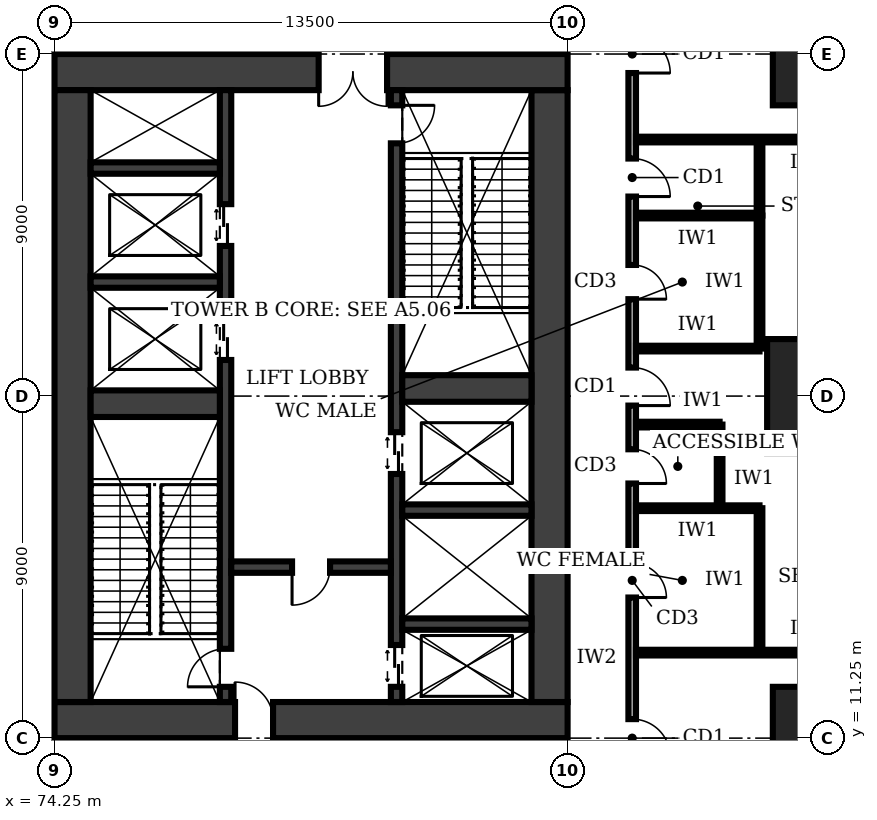
"""IFC4 building model, lengths in metres.
Left out: names, types, materials, properties, quantities, classifications, styles, units other than length and angle.
Written with IfcOpenShell. Run it as: python <this file> out.ifc"""

import sys

from ifc_helpers import new_model, si_unit, direction, frame, frame_2d, origin, origin_2d, place, context, subcontext, project, spatial, rectangle, extrude, element, fill, save


model = new_model("IFC4")
c1 = context("Model", 3, precision=1e-05, world=origin(), true_north=direction((0.0, 1.0)))
c2 = subcontext(c1, "Body", "Model", "MODEL_VIEW")
j1 = project(units=[si_unit("LENGTHUNIT", "METRE"), si_unit("PLANEANGLEUNIT", "RADIAN")], contexts=[c1])
p1 = place(None, origin())
s1 = spatial("IfcSite", under=j1, at=p1, CompositionType="ELEMENT")
p2 = place(p1, origin())
s2 = spatial("IfcBuilding", under=s1, at=p2, CompositionType="ELEMENT")
p3 = place(p2, frame((0.0, 0.0, 11.0)))
s3 = spatial("IfcBuildingStorey", under=s2, at=p3, CompositionType="ELEMENT", Elevation=11.0)
p4 = place(p3, frame((74.25, 11.725, 0.0), z_axis=(0.0, 0.0, 1.0), x_axis=(1.0, 0.0, 0.0)))
e1 = element("IfcWall", 1, at=p4, inside=s3, PredefinedType="SHEAR", context=c2, shape_type="SweptSolid", body=[
    extrude(rectangle(XDim=13.5, YDim=0.95, at=frame_2d((6.75, 0.0))), origin(), (0.0, 0.0, 1.0), 5.0),
])
p5 = place(p4, frame((4.75, 0.0, 0.0)))
e2 = element("IfcOpeningElement", 2, at=p5, cuts=e1, PredefinedType="OPENING", context=c2, shape_type="SweptSolid", body=[
    extrude(rectangle(XDim=1.0, YDim=2.1, at=frame_2d((0.5, 1.05))), frame((0.0, 0.485, 0.0), z_axis=(0.0, -1.0, 0.0), x_axis=(1.0, 0.0, 0.0)), (0.0, 0.0, 1.0), 0.97),
])
p6 = place(p3, frame((87.275, 12.2, 0.0), z_axis=(0.0, 0.0, 1.0), x_axis=(0.0, 1.0, 0.0)))
e3 = element("IfcWall", 3, at=p6, inside=s3, PredefinedType="SHEAR", context=c2, shape_type="SweptSolid", body=[
    extrude(rectangle(XDim=16.1, YDim=0.95, at=frame_2d((8.05, 0.0))), origin(), (0.0, 0.0, 1.0), 5.0),
])
p7 = place(p3, frame((87.75, 28.775, 0.0), z_axis=(0.0, 0.0, 1.0), x_axis=(-1.0, 0.0, 0.0)))
e4 = element("IfcWall", 4, at=p7, inside=s3, PredefinedType="SHEAR", context=c2, shape_type="SweptSolid", body=[
    extrude(rectangle(XDim=13.5, YDim=0.95, at=frame_2d((6.75, 0.0))), origin(), (0.0, 0.0, 1.0), 5.0),
])
p8 = place(p7, frame((4.75, 0.0, 0.0)))
e5 = element("IfcOpeningElement", 5, at=p8, cuts=e4, PredefinedType="OPENING", context=c2, shape_type="SweptSolid", body=[
    extrude(rectangle(XDim=1.8, YDim=2.1, at=frame_2d((0.9, 1.05))), frame((0.0, 0.485, 0.0), z_axis=(0.0, -1.0, 0.0), x_axis=(1.0, 0.0, 0.0)), (0.0, 0.0, 1.0), 0.97),
])
p9 = place(p3, frame((74.725, 28.3, 0.0), z_axis=(0.0, 0.0, 1.0), x_axis=(0.0, -1.0, 0.0)))
e6 = element("IfcWall", 6, at=p9, inside=s3, PredefinedType="SHEAR", context=c2, shape_type="SweptSolid", body=[
    extrude(rectangle(XDim=16.1, YDim=0.95, at=frame_2d((8.05, 0.0))), origin(), (0.0, 0.0, 1.0), 5.0),
])
p10 = place(p3, frame((78.75, 12.2, 0.0), z_axis=(0.0, 0.0, 1.0), x_axis=(0.0, 1.0, 0.0)))
e7 = element("IfcWall", 7, at=p10, inside=s3, PredefinedType="SHEAR", context=c2, shape_type="SweptSolid", body=[
    extrude(rectangle(XDim=16.1, YDim=0.3, at=frame_2d((8.05, 0.0))), origin(), (0.0, 0.0, 1.0), 5.0),
])
p11 = place(p10, frame((0.4, 0.0, 0.0)))
e8 = element("IfcOpeningElement", 8, at=p11, cuts=e7, PredefinedType="OPENING", context=c2, shape_type="SweptSolid", body=[
    extrude(rectangle(XDim=1.0, YDim=2.1, at=frame_2d((0.5, 1.05))), frame((0.0, 0.16, 0.0), z_axis=(0.0, -1.0, 0.0), x_axis=(1.0, 0.0, 0.0)), (0.0, 0.0, 1.0), 0.32),
])
p12 = place(p10, frame((9.0, 0.0, 0.0)))
e9 = element("IfcOpeningElement", 9, at=p12, cuts=e7, PredefinedType="OPENING", context=c2, shape_type="SweptSolid", body=[
    extrude(rectangle(XDim=1.1, YDim=2.1, at=frame_2d((0.55, 1.05))), frame((0.0, 0.16, 0.0), z_axis=(0.0, -1.0, 0.0), x_axis=(1.0, 0.0, 0.0)), (0.0, 0.0, 1.0), 0.32),
])
p13 = place(p10, frame((12.0, 0.0, 0.0)))
e10 = element("IfcOpeningElement", 10, at=p13, cuts=e7, PredefinedType="OPENING", context=c2, shape_type="SweptSolid", body=[
    extrude(rectangle(XDim=1.1, YDim=2.1, at=frame_2d((0.55, 1.05))), frame((0.0, 0.16, 0.0), z_axis=(0.0, -1.0, 0.0), x_axis=(1.0, 0.0, 0.0)), (0.0, 0.0, 1.0), 0.32),
])
p14 = place(p3, frame((83.25, 12.2, 0.0), z_axis=(0.0, 0.0, 1.0), x_axis=(0.0, 1.0, 0.0)))
e11 = element("IfcWall", 11, at=p14, inside=s3, PredefinedType="SHEAR", context=c2, shape_type="SweptSolid", body=[
    extrude(rectangle(XDim=16.1, YDim=0.3, at=frame_2d((8.05, 0.0))), origin(), (0.0, 0.0, 1.0), 5.0),
])
p15 = place(p14, frame((14.7, 0.0, 0.0)))
e12 = element("IfcOpeningElement", 12, at=p15, cuts=e11, PredefinedType="OPENING", context=c2, shape_type="SweptSolid", body=[
    extrude(rectangle(XDim=1.0, YDim=2.1, at=frame_2d((0.5, 1.05))), frame((0.0, 0.16, 0.0), z_axis=(0.0, -1.0, 0.0), x_axis=(1.0, 0.0, 0.0)), (0.0, 0.0, 1.0), 0.32),
])
p16 = place(p14, frame((0.4, 0.0, 0.0)))
e13 = element("IfcOpeningElement", 13, at=p16, cuts=e11, PredefinedType="OPENING", context=c2, shape_type="SweptSolid", body=[
    extrude(rectangle(XDim=1.1, YDim=2.1, at=frame_2d((0.55, 1.05))), frame((0.0, 0.16, 0.0), z_axis=(0.0, -1.0, 0.0), x_axis=(1.0, 0.0, 0.0)), (0.0, 0.0, 1.0), 0.32),
])
p17 = place(p14, frame((6.0, 0.0, 0.0)))
e14 = element("IfcOpeningElement", 14, at=p17, cuts=e11, PredefinedType="OPENING", context=c2, shape_type="SweptSolid", body=[
    extrude(rectangle(XDim=1.1, YDim=2.1, at=frame_2d((0.55, 1.05))), frame((0.0, 0.16, 0.0), z_axis=(0.0, -1.0, 0.0), x_axis=(1.0, 0.0, 0.0)), (0.0, 0.0, 1.0), 0.32),
])
p18 = place(p3, frame((75.2, 20.05, 0.0), z_axis=(0.0, 0.0, 1.0), x_axis=(1.0, 0.0, 0.0)))
e15 = element("IfcWall", 15, at=p18, inside=s3, PredefinedType="SHEAR", context=c2, shape_type="SweptSolid", body=[
    extrude(rectangle(XDim=3.4, YDim=0.7, at=frame_2d((1.7, 0.0))), origin(), (0.0, 0.0, 1.0), 5.0),
])
p19 = place(p3, frame((78.9, 15.75, 0.0), z_axis=(0.0, 0.0, 1.0), x_axis=(1.0, 0.0, 0.0)))
e16 = element("IfcWall", 16, at=p19, inside=s3, PredefinedType="SHEAR", context=c2, shape_type="SweptSolid", body=[
    extrude(rectangle(XDim=4.2, YDim=0.3, at=frame_2d((2.1, 0.0))), origin(), (0.0, 0.0, 1.0), 5.0),
])
p20 = place(p19, frame((1.6, 0.0, 0.0)))
e17 = element("IfcOpeningElement", 17, at=p20, cuts=e16, PredefinedType="OPENING", context=c2, shape_type="SweptSolid", body=[
    extrude(rectangle(XDim=1.0, YDim=2.1, at=frame_2d((0.5, 1.05))), frame((0.0, 0.16, 0.0), z_axis=(0.0, -1.0, 0.0), x_axis=(1.0, 0.0, 0.0)), (0.0, 0.0, 1.0), 0.32),
])
for number, where, z_axis, x_axis in (
    (18, (83.4, 14.25, 0.0), (0.0, 0.0, 1.0), (1.0, 0.0, 0.0)),
    (19, (83.4, 17.25, 0.0), (0.0, 0.0, 1.0), (1.0, 0.0, 0.0)),
):
    element("IfcWall", number, at=place(p3, frame(where, z_axis=z_axis, x_axis=x_axis)), inside=s3, PredefinedType="SHEAR", context=c2, shape_type="SweptSolid", body=[
        extrude(rectangle(XDim=3.4, YDim=0.3, at=frame_2d((1.7, 0.0))), origin(), (0.0, 0.0, 1.0), 5.0),
    ])
p21 = place(p3, frame((83.4, 20.45, 0.0), z_axis=(0.0, 0.0, 1.0), x_axis=(1.0, 0.0, 0.0)))
e20 = element("IfcWall", 20, at=p21, inside=s3, PredefinedType="SHEAR", context=c2, shape_type="SweptSolid", body=[
    extrude(rectangle(XDim=3.4, YDim=0.7, at=frame_2d((1.7, 0.0))), origin(), (0.0, 0.0, 1.0), 5.0),
])
for number, where, z_axis, x_axis in (
    (21, (75.2, 23.25, 0.0), (0.0, 0.0, 1.0), (1.0, 0.0, 0.0)),
    (22, (75.2, 26.25, 0.0), (0.0, 0.0, 1.0), (1.0, 0.0, 0.0)),
):
    element("IfcWall", number, at=place(p3, frame(where, z_axis=z_axis, x_axis=x_axis)), inside=s3, PredefinedType="SHEAR", context=c2, shape_type="SweptSolid", body=[
        extrude(rectangle(XDim=3.4, YDim=0.3, at=frame_2d((1.7, 0.0))), origin(), (0.0, 0.0, 1.0), 5.0),
    ])
p22 = place(p3, frame((94.5, 11.25, 0.0), z_axis=(0.0, 0.0, 1.0), x_axis=(1.0, 0.0, 0.0)))
e23 = element("IfcColumn", 23, at=p22, inside=s3, PredefinedType="COLUMN", context=c2, shape_type="SweptSolid", body=[
    extrude(rectangle(XDim=2.7, YDim=2.7, at=origin_2d()), origin(), (0.0, 0.0, 1.0), 5.0),
])
p23 = place(p3, frame((94.5, 20.25, 0.0), z_axis=(0.0, 0.0, 1.0), x_axis=(1.0, 0.0, 0.0)))
e24 = element("IfcColumn", 24, at=p23, inside=s3, PredefinedType="COLUMN", context=c2, shape_type="SweptSolid", body=[
    extrude(rectangle(XDim=3.0, YDim=3.0, at=origin_2d()), origin(), (0.0, 0.0, 1.0), 5.0),
])
p24 = place(p3, frame((94.5, 29.25, 0.0), z_axis=(0.0, 0.0, 1.0), x_axis=(1.0, 0.0, 0.0)))
e25 = element("IfcColumn", 25, at=p24, inside=s3, PredefinedType="COLUMN", context=c2, shape_type="SweptSolid", body=[
    extrude(rectangle(XDim=2.7, YDim=2.7, at=origin_2d()), origin(), (0.0, 0.0, 1.0), 5.0),
])
p25 = place(p3, frame((89.45, 9.2, 0.0), z_axis=(0.0, 0.0, 1.0), x_axis=(0.0, 1.0, 0.0)))
e26 = element("IfcWall", 26, at=p25, inside=s3, PredefinedType="SOLIDWALL", context=c2, shape_type="SweptSolid", body=[
    extrude(rectangle(XDim=22.3, YDim=0.2, at=frame_2d((11.15, 0.0))), origin(), (0.0, 0.0, 1.0), 4.7),
])
p26 = place(p25, frame((1.55, 0.0, 0.0)))
e27 = element("IfcOpeningElement", 27, at=p26, cuts=e26, PredefinedType="OPENING", context=c2, shape_type="SweptSolid", body=[
    extrude(rectangle(XDim=1.0, YDim=2.1, at=frame_2d((0.5, 1.05))), frame((0.0, 0.11, 0.0), z_axis=(0.0, -1.0, 0.0), x_axis=(1.0, 0.0, 0.0)), (0.0, 0.0, 1.0), 0.22),
])
p27 = place(p25, frame((5.75, 0.0, 0.0)))
e28 = element("IfcOpeningElement", 28, at=p27, cuts=e26, PredefinedType="OPENING", context=c2, shape_type="SweptSolid", body=[
    extrude(rectangle(XDim=0.9, YDim=2.1, at=frame_2d((0.45, 1.05))), frame((0.0, 0.11, 0.0), z_axis=(0.0, -1.0, 0.0), x_axis=(1.0, 0.0, 0.0)), (0.0, 0.0, 1.0), 0.22),
])
p28 = place(p25, frame((8.75, 0.0, 0.0)))
e29 = element("IfcOpeningElement", 29, at=p28, cuts=e26, PredefinedType="OPENING", context=c2, shape_type="SweptSolid", body=[
    extrude(rectangle(XDim=0.9, YDim=2.1, at=frame_2d((0.45, 1.05))), frame((0.0, 0.11, 0.0), z_axis=(0.0, -1.0, 0.0), x_axis=(1.0, 0.0, 0.0)), (0.0, 0.0, 1.0), 0.22),
])
p29 = place(p25, frame((13.6, 0.0, 0.0)))
e30 = element("IfcOpeningElement", 30, at=p29, cuts=e26, PredefinedType="OPENING", context=c2, shape_type="SweptSolid", body=[
    extrude(rectangle(XDim=0.9, YDim=2.1, at=frame_2d((0.45, 1.05))), frame((0.0, 0.11, 0.0), z_axis=(0.0, -1.0, 0.0), x_axis=(1.0, 0.0, 0.0)), (0.0, 0.0, 1.0), 0.22),
])
p30 = place(p25, frame((16.3, 0.0, 0.0)))
e31 = element("IfcOpeningElement", 31, at=p30, cuts=e26, PredefinedType="OPENING", context=c2, shape_type="SweptSolid", body=[
    extrude(rectangle(XDim=1.0, YDim=2.1, at=frame_2d((0.5, 1.05))), frame((0.0, 0.11, 0.0), z_axis=(0.0, -1.0, 0.0), x_axis=(1.0, 0.0, 0.0)), (0.0, 0.0, 1.0), 0.22),
])
p31 = place(p25, frame((10.8, 0.0, 0.0)))
e32 = element("IfcOpeningElement", 32, at=p31, cuts=e26, PredefinedType="OPENING", context=c2, shape_type="SweptSolid", body=[
    extrude(rectangle(XDim=1.0, YDim=2.1, at=frame_2d((0.5, 1.05))), frame((0.0, 0.11, 0.0), z_axis=(0.0, -1.0, 0.0), x_axis=(1.0, 0.0, 0.0)), (0.0, 0.0, 1.0), 0.22),
])
p32 = place(p25, frame((19.55, 0.0, 0.0)))
e33 = element("IfcOpeningElement", 33, at=p32, cuts=e26, PredefinedType="OPENING", context=c2, shape_type="SweptSolid", body=[
    extrude(rectangle(XDim=1.0, YDim=2.1, at=frame_2d((0.5, 1.05))), frame((0.0, 0.11, 0.0), z_axis=(0.0, -1.0, 0.0), x_axis=(1.0, 0.0, 0.0)), (0.0, 0.0, 1.0), 0.22),
])
for number, where, z_axis, x_axis in (
    (34, (89.55, 13.5, 0.0), (0.0, 0.0, 1.0), (1.0, 0.0, 0.0)),
    (35, (89.55, 27.0, 0.0), (0.0, 0.0, 1.0), (1.0, 0.0, 0.0)),
):
    element("IfcWall", number, at=place(p3, frame(where, z_axis=z_axis, x_axis=x_axis)), inside=s3, PredefinedType="PARTITIONING", context=c2, shape_type="SweptSolid", body=[
        extrude(rectangle(XDim=9.15, YDim=0.15, at=frame_2d((4.575, 0.0))), origin(), (0.0, 0.0, 1.0), 4.7),
    ])
p33 = place(p3, frame((89.55, 17.3, 0.0), z_axis=(0.0, 0.0, 1.0), x_axis=(1.0, 0.0, 0.0)))
e36 = element("IfcWall", 36, at=p33, inside=s3, PredefinedType="PARTITIONING", context=c2, shape_type="SweptSolid", body=[
    extrude(rectangle(XDim=3.25, YDim=0.15, at=frame_2d((1.625, 0.0))), origin(), (0.0, 0.0, 1.0), 4.7),
])
p34 = place(p3, frame((89.55, 19.5, 0.0), z_axis=(0.0, 0.0, 1.0), x_axis=(1.0, 0.0, 0.0)))
e37 = element("IfcWall", 37, at=p34, inside=s3, PredefinedType="PARTITIONING", context=c2, shape_type="SweptSolid", body=[
    extrude(rectangle(XDim=2.2, YDim=0.15, at=frame_2d((1.1, 0.0))), origin(), (0.0, 0.0, 1.0), 4.7),
])
for number, where, z_axis, x_axis in (
    (38, (89.55, 21.5, 0.0), (0.0, 0.0, 1.0), (1.0, 0.0, 0.0)),
    (39, (89.55, 25.0, 0.0), (0.0, 0.0, 1.0), (1.0, 0.0, 0.0)),
):
    element("IfcWall", number, at=place(p3, frame(where, z_axis=z_axis, x_axis=x_axis)), inside=s3, PredefinedType="PARTITIONING", context=c2, shape_type="SweptSolid", body=[
        extrude(rectangle(XDim=3.25, YDim=0.15, at=frame_2d((1.625, 0.0))), origin(), (0.0, 0.0, 1.0), 4.7),
    ])
p35 = place(p3, frame((92.8, 13.5, 0.0), z_axis=(0.0, 0.0, 1.0), x_axis=(0.0, 1.0, 0.0)))
e40 = element("IfcWall", 40, at=p35, inside=s3, PredefinedType="PARTITIONING", context=c2, shape_type="SweptSolid", body=[
    extrude(rectangle(XDim=3.8, YDim=0.15, at=frame_2d((1.9, 0.0))), origin(), (0.0, 0.0, 1.0), 4.7),
])
p36 = place(p3, frame((91.75, 17.3, 0.0), z_axis=(0.0, 0.0, 1.0), x_axis=(0.0, 1.0, 0.0)))
e41 = element("IfcWall", 41, at=p36, inside=s3, PredefinedType="PARTITIONING", context=c2, shape_type="SweptSolid", body=[
    extrude(rectangle(XDim=2.2, YDim=0.15, at=frame_2d((1.1, 0.0))), origin(), (0.0, 0.0, 1.0), 4.7),
])
p37 = place(p3, frame((92.8, 21.5, 0.0), z_axis=(0.0, 0.0, 1.0), x_axis=(0.0, 1.0, 0.0)))
e42 = element("IfcWall", 42, at=p37, inside=s3, PredefinedType="PARTITIONING", context=c2, shape_type="SweptSolid", body=[
    extrude(rectangle(XDim=3.5, YDim=0.15, at=frame_2d((1.75, 0.0))), origin(), (0.0, 0.0, 1.0), 4.7),
])
p38 = place(p3, frame((92.8, 25.0, 0.0), z_axis=(0.0, 0.0, 1.0), x_axis=(0.0, 1.0, 0.0)))
e43 = element("IfcWall", 43, at=p38, inside=s3, PredefinedType="PARTITIONING", context=c2, shape_type="SweptSolid", body=[
    extrude(rectangle(XDim=2.0, YDim=0.15, at=frame_2d((1.0, 0.0))), origin(), (0.0, 0.0, 1.0), 4.7),
])
p39 = place(p5, origin())
e44 = element("IfcDoor", 44, at=p39, inside=s3, OperationType="SINGLE_SWING_LEFT", PredefinedType="DOOR", context=c2, shape_type="SweptSolid", body=[
    extrude(rectangle(XDim=1.0, YDim=2.1, at=frame_2d((0.5, 1.05))), frame((0.0, 0.025, 0.0), z_axis=(0.0, -1.0, 0.0), x_axis=(1.0, 0.0, 0.0)), (0.0, 0.0, 1.0), 0.05),
])
fill(e2, e44)
p40 = place(p8, origin())
e45 = element("IfcDoor", 45, at=p40, inside=s3, OperationType="DOUBLE_DOOR_SINGLE_SWING", PredefinedType="DOOR", context=c2, shape_type="SweptSolid", body=[
    extrude(rectangle(XDim=1.8, YDim=2.1, at=frame_2d((0.9, 1.05))), frame((0.0, 0.025, 0.0), z_axis=(0.0, -1.0, 0.0), x_axis=(1.0, 0.0, 0.0)), (0.0, 0.0, 1.0), 0.05),
])
fill(e5, e45)
p41 = place(p20, frame((1.0, 0.0, 0.0), z_axis=(0.0, 0.0, 1.0), x_axis=(-1.0, 0.0, 0.0)))
e46 = element("IfcDoor", 46, at=p41, inside=s3, OperationType="SINGLE_SWING_RIGHT", PredefinedType="DOOR", context=c2, shape_type="SweptSolid", body=[
    extrude(rectangle(XDim=1.0, YDim=2.1, at=frame_2d((0.5, 1.05))), frame((0.0, 0.025, 0.0), z_axis=(0.0, -1.0, 0.0), x_axis=(1.0, 0.0, 0.0)), (0.0, 0.0, 1.0), 0.05),
])
fill(e17, e46)
p42 = place(p11, origin())
e47 = element("IfcDoor", 47, at=p42, inside=s3, OperationType="SINGLE_SWING_LEFT", PredefinedType="DOOR", context=c2, shape_type="SweptSolid", body=[
    extrude(rectangle(XDim=1.0, YDim=2.1, at=frame_2d((0.5, 1.05))), frame((0.0, 0.025, 0.0), z_axis=(0.0, -1.0, 0.0), x_axis=(1.0, 0.0, 0.0)), (0.0, 0.0, 1.0), 0.05),
])
fill(e8, e47)
p43 = place(p15, frame((1.0, 0.0, 0.0), z_axis=(0.0, 0.0, 1.0), x_axis=(-1.0, 0.0, 0.0)))
e48 = element("IfcDoor", 48, at=p43, inside=s3, OperationType="SINGLE_SWING_LEFT", PredefinedType="DOOR", context=c2, shape_type="SweptSolid", body=[
    extrude(rectangle(XDim=1.0, YDim=2.1, at=frame_2d((0.5, 1.05))), frame((0.0, 0.025, 0.0), z_axis=(0.0, -1.0, 0.0), x_axis=(1.0, 0.0, 0.0)), (0.0, 0.0, 1.0), 0.05),
])
fill(e12, e48)
p44 = place(p16, origin())
e49 = element("IfcDoor", 49, at=p44, inside=s3, OperationType="DOUBLE_DOOR_SLIDING", PredefinedType="DOOR", context=c2, shape_type="SweptSolid", body=[
    extrude(rectangle(XDim=1.1, YDim=2.1, at=frame_2d((0.55, 1.05))), frame((0.0, 0.025, 0.0), z_axis=(0.0, -1.0, 0.0), x_axis=(1.0, 0.0, 0.0)), (0.0, 0.0, 1.0), 0.05),
])
fill(e13, e49)
p45 = place(p12, origin())
e50 = element("IfcDoor", 50, at=p45, inside=s3, OperationType="DOUBLE_DOOR_SLIDING", PredefinedType="DOOR", context=c2, shape_type="SweptSolid", body=[
    extrude(rectangle(XDim=1.1, YDim=2.1, at=frame_2d((0.55, 1.05))), frame((0.0, 0.025, 0.0), z_axis=(0.0, -1.0, 0.0), x_axis=(1.0, 0.0, 0.0)), (0.0, 0.0, 1.0), 0.05),
])
fill(e9, e50)
p46 = place(p13, origin())
e51 = element("IfcDoor", 51, at=p46, inside=s3, OperationType="DOUBLE_DOOR_SLIDING", PredefinedType="DOOR", context=c2, shape_type="SweptSolid", body=[
    extrude(rectangle(XDim=1.1, YDim=2.1, at=frame_2d((0.55, 1.05))), frame((0.0, 0.025, 0.0), z_axis=(0.0, -1.0, 0.0), x_axis=(1.0, 0.0, 0.0)), (0.0, 0.0, 1.0), 0.05),
])
fill(e10, e51)
p47 = place(p17, origin())
e52 = element("IfcDoor", 52, at=p47, inside=s3, OperationType="DOUBLE_DOOR_SLIDING", PredefinedType="DOOR", context=c2, shape_type="SweptSolid", body=[
    extrude(rectangle(XDim=1.1, YDim=2.1, at=frame_2d((0.55, 1.05))), frame((0.0, 0.025, 0.0), z_axis=(0.0, -1.0, 0.0), x_axis=(1.0, 0.0, 0.0)), (0.0, 0.0, 1.0), 0.05),
])
fill(e14, e52)
p48 = place(p26, frame((1.0, 0.0, 0.0), z_axis=(0.0, 0.0, 1.0), x_axis=(-1.0, 0.0, 0.0)))
e53 = element("IfcDoor", 53, at=p48, inside=s3, OperationType="SINGLE_SWING_RIGHT", PredefinedType="DOOR", context=c2, shape_type="SweptSolid", body=[
    extrude(rectangle(XDim=1.0, YDim=2.1, at=frame_2d((0.5, 1.05))), frame((0.0, 0.025, 0.0), z_axis=(0.0, -1.0, 0.0), x_axis=(1.0, 0.0, 0.0)), (0.0, 0.0, 1.0), 0.05),
])
fill(e27, e53)
p49 = place(p27, frame((0.9, 0.0, 0.0), z_axis=(0.0, 0.0, 1.0), x_axis=(-1.0, 0.0, 0.0)))
e54 = element("IfcDoor", 54, at=p49, inside=s3, OperationType="SINGLE_SWING_RIGHT", PredefinedType="DOOR", context=c2, shape_type="SweptSolid", body=[
    extrude(rectangle(XDim=0.9, YDim=2.1, at=frame_2d((0.45, 1.05))), frame((0.0, 0.025, 0.0), z_axis=(0.0, -1.0, 0.0), x_axis=(1.0, 0.0, 0.0)), (0.0, 0.0, 1.0), 0.05),
])
fill(e28, e54)
p50 = place(p28, frame((0.9, 0.0, 0.0), z_axis=(0.0, 0.0, 1.0), x_axis=(-1.0, 0.0, 0.0)))
e55 = element("IfcDoor", 55, at=p50, inside=s3, OperationType="SINGLE_SWING_RIGHT", PredefinedType="DOOR", context=c2, shape_type="SweptSolid", body=[
    extrude(rectangle(XDim=0.9, YDim=2.1, at=frame_2d((0.45, 1.05))), frame((0.0, 0.025, 0.0), z_axis=(0.0, -1.0, 0.0), x_axis=(1.0, 0.0, 0.0)), (0.0, 0.0, 1.0), 0.05),
])
fill(e29, e55)
p51 = place(p29, frame((0.9, 0.0, 0.0), z_axis=(0.0, 0.0, 1.0), x_axis=(-1.0, 0.0, 0.0)))
e56 = element("IfcDoor", 56, at=p51, inside=s3, OperationType="SINGLE_SWING_RIGHT", PredefinedType="DOOR", context=c2, shape_type="SweptSolid", body=[
    extrude(rectangle(XDim=0.9, YDim=2.1, at=frame_2d((0.45, 1.05))), frame((0.0, 0.025, 0.0), z_axis=(0.0, -1.0, 0.0), x_axis=(1.0, 0.0, 0.0)), (0.0, 0.0, 1.0), 0.05),
])
fill(e30, e56)
p52 = place(p30, frame((1.0, 0.0, 0.0), z_axis=(0.0, 0.0, 1.0), x_axis=(-1.0, 0.0, 0.0)))
e57 = element("IfcDoor", 57, at=p52, inside=s3, OperationType="SINGLE_SWING_RIGHT", PredefinedType="DOOR", context=c2, shape_type="SweptSolid", body=[
    extrude(rectangle(XDim=1.0, YDim=2.1, at=frame_2d((0.5, 1.05))), frame((0.0, 0.025, 0.0), z_axis=(0.0, -1.0, 0.0), x_axis=(1.0, 0.0, 0.0)), (0.0, 0.0, 1.0), 0.05),
])
fill(e31, e57)
p53 = place(p31, frame((1.0, 0.0, 0.0), z_axis=(0.0, 0.0, 1.0), x_axis=(-1.0, 0.0, 0.0)))
e58 = element("IfcDoor", 58, at=p53, inside=s3, OperationType="SINGLE_SWING_RIGHT", PredefinedType="DOOR", context=c2, shape_type="SweptSolid", body=[
    extrude(rectangle(XDim=1.0, YDim=2.1, at=frame_2d((0.5, 1.05))), frame((0.0, 0.025, 0.0), z_axis=(0.0, -1.0, 0.0), x_axis=(1.0, 0.0, 0.0)), (0.0, 0.0, 1.0), 0.05),
])
fill(e32, e58)
p54 = place(p32, frame((1.0, 0.0, 0.0), z_axis=(0.0, 0.0, 1.0), x_axis=(-1.0, 0.0, 0.0)))
e59 = element("IfcDoor", 59, at=p54, inside=s3, OperationType="SINGLE_SWING_RIGHT", PredefinedType="DOOR", context=c2, shape_type="SweptSolid", body=[
    extrude(rectangle(XDim=1.0, YDim=2.1, at=frame_2d((0.5, 1.05))), frame((0.0, 0.025, 0.0), z_axis=(0.0, -1.0, 0.0), x_axis=(1.0, 0.0, 0.0)), (0.0, 0.0, 1.0), 0.05),
])
fill(e33, e59)
save(model, sys.argv[1])
